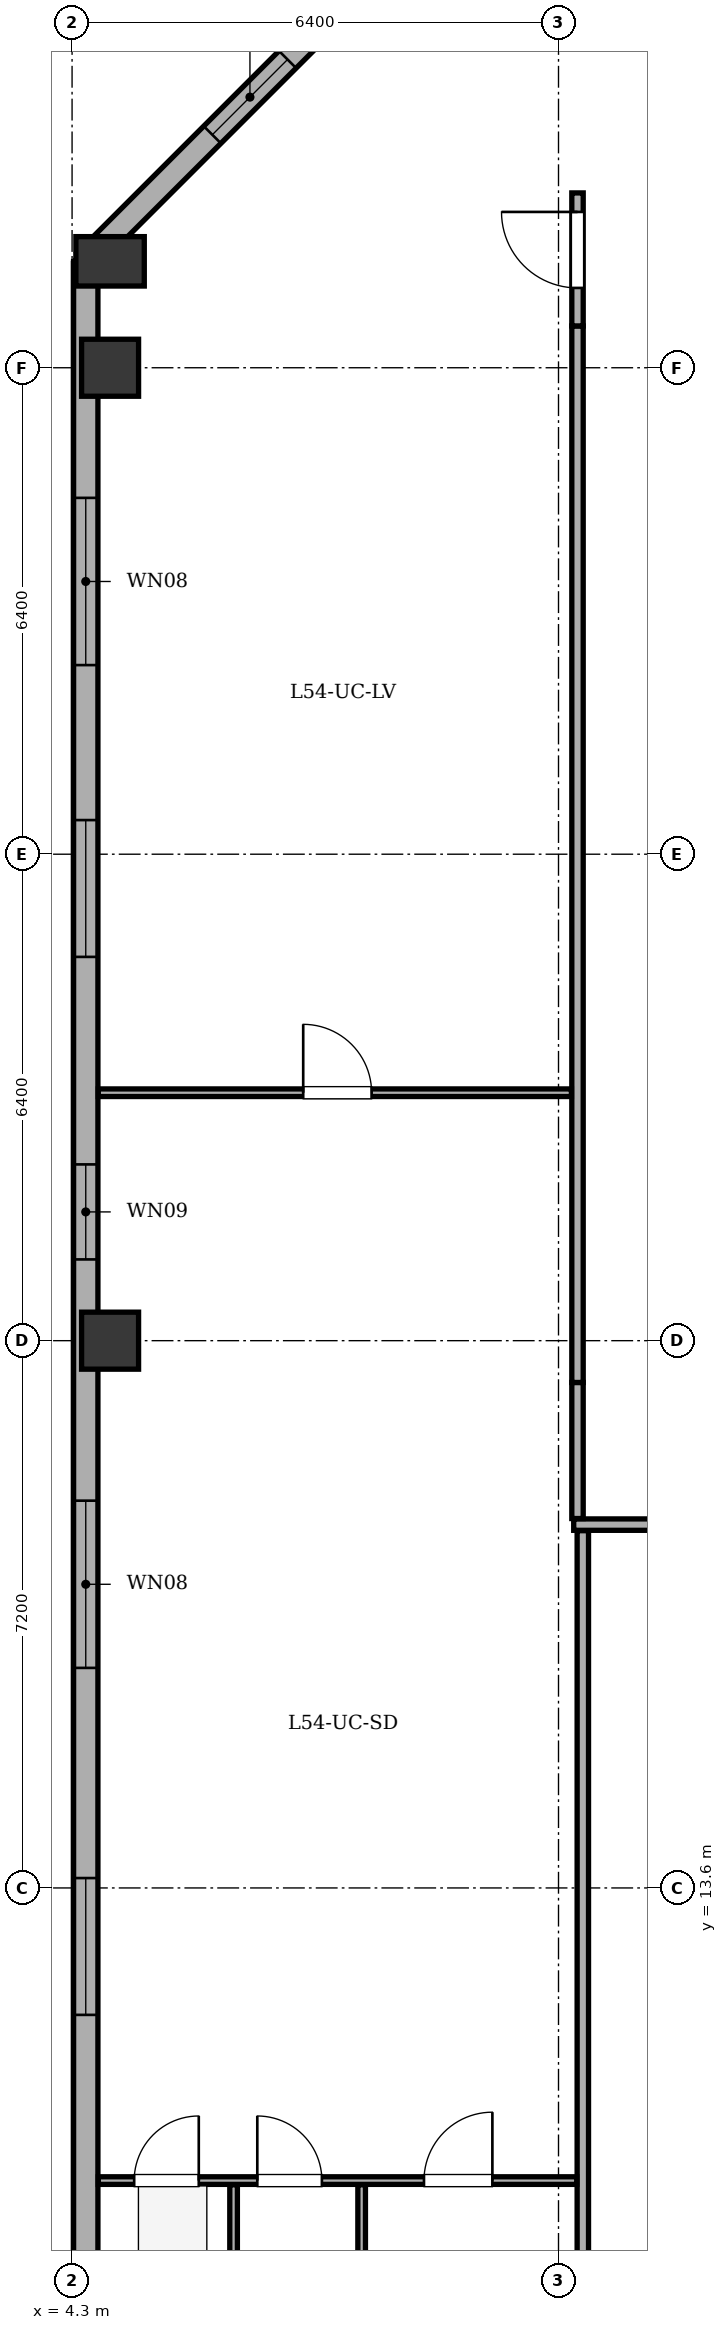
"""IFC4 building model, lengths in metres.
Left out: names, types, materials, properties, quantities, classifications, styles, units other than length and angle.
Written with IfcOpenShell. Run it as: python <this file> out.ifc"""

import sys

from ifc_helpers import new_model, si_unit, direction, frame, frame_2d, origin, origin_2d, place, context, subcontext, project, spatial, rectangle, extrude, element, fill, save


model = new_model("IFC4")
c1 = context("Model", 3, precision=1e-05, world=origin(), true_north=direction((0.0, 1.0)))
c2 = subcontext(c1, "Body", "Model", "MODEL_VIEW")
j1 = project(units=[si_unit("LENGTHUNIT", "METRE"), si_unit("PLANEANGLEUNIT", "RADIAN")], contexts=[c1])
p1 = place(None, origin())
s1 = spatial("IfcSite", under=j1, at=p1, CompositionType="ELEMENT")
p2 = place(p1, origin())
s2 = spatial("IfcBuilding", under=s1, at=p2, CompositionType="ELEMENT")
p3 = place(p2, frame((0.0, 0.0, 210.9)))
s3 = spatial("IfcBuildingStorey", under=s2, at=p3, CompositionType="ELEMENT", Elevation=210.9)
for number, where, z_axis, x_axis in (
    (1, (4.8, 20.8, 0.0), (0.0, 0.0, 1.0), (1.0, 0.0, 0.0)),
    (2, (4.8, 33.6, 0.0), (0.0, 0.0, 1.0), (1.0, 0.0, 0.0)),
):
    element("IfcColumn", number, at=place(p3, frame(where, z_axis=z_axis, x_axis=x_axis)), inside=s3, PredefinedType="COLUMN", context=c2, shape_type="SweptSolid", body=[
        extrude(rectangle(XDim=0.75, YDim=0.75, at=origin_2d()), origin(), (0.0, 0.0, 1.0), 3.4),
    ])
p4 = place(p3, frame((4.8, 35.0, 0.0), z_axis=(0.0, 0.0, 1.0), x_axis=(1.0, 0.0, 0.0)))
e3 = element("IfcColumn", 3, at=p4, inside=s3, PredefinedType="COLUMN", context=c2, shape_type="SweptSolid", body=[
    extrude(rectangle(XDim=0.65, YDim=0.9, at=origin_2d()), origin(), (0.0, 0.0, 1.0), 3.4),
])
p5 = place(p3, frame((4.48, 7.2, 0.0), z_axis=(0.0, 0.0, 1.0), x_axis=(0.0, 1.0, 0.0)))
e4 = element("IfcWall", 4, at=p5, inside=s3, PredefinedType="STANDARD", context=c2, shape_type="SweptSolid", body=[
    extrude(rectangle(XDim=27.8, YDim=0.32, at=frame_2d((13.9, 0.0))), origin(), (0.0, 0.0, 1.0), 2.725),
])
p6 = place(p5, frame((4.73, 0.0, 0.75)))
e5 = element("IfcOpeningElement", 5, at=p6, cuts=e4, PredefinedType="OPENING", context=c2, shape_type="SweptSolid", body=[
    extrude(rectangle(XDim=1.8, YDim=1.7, at=frame_2d((0.9, 0.85))), frame((0.0, 0.17, 0.0), z_axis=(0.0, -1.0, 0.0), x_axis=(1.0, 0.0, 0.0)), (0.0, 0.0, 1.0), 0.34),
])
p7 = place(p5, frame((9.295, 0.0, 0.75)))
e6 = element("IfcOpeningElement", 6, at=p7, cuts=e4, PredefinedType="OPENING", context=c2, shape_type="SweptSolid", body=[
    extrude(rectangle(XDim=2.2, YDim=1.7, at=frame_2d((1.1, 0.85))), frame((0.0, 0.17, 0.0), z_axis=(0.0, -1.0, 0.0), x_axis=(1.0, 0.0, 0.0)), (0.0, 0.0, 1.0), 0.34),
])
p8 = place(p5, frame((14.669, 0.0, 0.75)))
e7 = element("IfcOpeningElement", 7, at=p8, cuts=e4, PredefinedType="OPENING", context=c2, shape_type="SweptSolid", body=[
    extrude(rectangle(XDim=1.25, YDim=1.7, at=frame_2d((0.625, 0.85))), frame((0.0, 0.17, 0.0), z_axis=(0.0, -1.0, 0.0), x_axis=(1.0, 0.0, 0.0)), (0.0, 0.0, 1.0), 0.34),
])
p9 = place(p5, frame((18.649, 0.0, 0.75)))
e8 = element("IfcOpeningElement", 8, at=p9, cuts=e4, PredefinedType="OPENING", context=c2, shape_type="SweptSolid", body=[
    extrude(rectangle(XDim=1.8, YDim=1.7, at=frame_2d((0.9, 0.85))), frame((0.0, 0.17, 0.0), z_axis=(0.0, -1.0, 0.0), x_axis=(1.0, 0.0, 0.0)), (0.0, 0.0, 1.0), 0.34),
])
p10 = place(p5, frame((22.488, 0.0, 0.75)))
e9 = element("IfcOpeningElement", 9, at=p10, cuts=e4, PredefinedType="OPENING", context=c2, shape_type="SweptSolid", body=[
    extrude(rectangle(XDim=2.2, YDim=1.7, at=frame_2d((1.1, 0.85))), frame((0.0, 0.17, 0.0), z_axis=(0.0, -1.0, 0.0), x_axis=(1.0, 0.0, 0.0)), (0.0, 0.0, 1.0), 0.34),
])
p11 = place(p3, frame((4.48, 35.0, 0.0), z_axis=(0.0, 0.0, 1.0), x_axis=(0.707106781187, 0.707106781187, 0.0)))
e10 = element("IfcWall", 10, at=p11, inside=s3, PredefinedType="STANDARD", context=c2, shape_type="SweptSolid", body=[
    extrude(rectangle(XDim=6.11, YDim=0.32, at=frame_2d((3.055, 0.0))), origin(), (0.0, 0.0, 1.0), 2.725),
])
p12 = place(p11, frame((2.355, 0.0, 0.75)))
e11 = element("IfcOpeningElement", 11, at=p12, cuts=e10, PredefinedType="OPENING", context=c2, shape_type="SweptSolid", body=[
    extrude(rectangle(XDim=1.4, YDim=1.65, at=frame_2d((0.7, 0.825))), frame((0.0, 0.17, 0.0), z_axis=(0.0, -1.0, 0.0), x_axis=(1.0, 0.0, 0.0)), (0.0, 0.0, 1.0), 0.34),
])
p13 = place(p3, frame((10.9, 18.38, 0.0), z_axis=(0.0, 0.0, 1.0), x_axis=(1.0, 0.0, 0.0)))
e12 = element("IfcWall", 12, at=p13, inside=s3, PredefinedType="PARTITIONING", context=c2, shape_type="SweptSolid", body=[
    extrude(rectangle(XDim=34.02, YDim=0.15, at=frame_2d((17.01, 0.0))), origin(), (0.0, 0.0, 1.0), 3.1),
])
p14 = place(p13, frame((7.727, 0.0, 0.0)))
e13 = element("IfcOpeningElement", 13, at=p14, cuts=e12, PredefinedType="OPENING", context=c2, shape_type="SweptSolid", body=[
    extrude(rectangle(XDim=1.0, YDim=2.1, at=frame_2d((0.5, 1.05))), frame((0.0, 0.085, 0.0), z_axis=(0.0, -1.0, 0.0), x_axis=(1.0, 0.0, 0.0)), (0.0, 0.0, 1.0), 0.17),
])
p15 = place(p13, frame((24.617, 0.0, 0.0)))
e14 = element("IfcOpeningElement", 14, at=p15, cuts=e12, PredefinedType="OPENING", context=c2, shape_type="SweptSolid", body=[
    extrude(rectangle(XDim=1.0, YDim=2.1, at=frame_2d((0.5, 1.05))), frame((0.0, 0.085, 0.0), z_axis=(0.0, -1.0, 0.0), x_axis=(1.0, 0.0, 0.0)), (0.0, 0.0, 1.0), 0.17),
])
p16 = place(p3, frame((11.02, 3.045, 0.0), z_axis=(0.0, 0.0, 1.0), x_axis=(0.0, 1.0, 0.0)))
e15 = element("IfcWall", 15, at=p16, inside=s3, PredefinedType="PARTITIONING", context=c2, shape_type="SweptSolid", body=[
    extrude(rectangle(XDim=15.255, YDim=0.15, at=frame_2d((7.627, 0.0))), origin(), (0.0, 0.0, 1.0), 3.1),
])
p17 = place(p3, frame((10.95, 18.46, 0.0), z_axis=(0.0, 0.0, 1.0), x_axis=(0.0, 1.0, 0.0)))
e16 = element("IfcWall", 16, at=p17, inside=s3, PredefinedType="PARTITIONING", context=c2, shape_type="SweptSolid", body=[
    extrude(rectangle(XDim=1.79, YDim=0.15, at=frame_2d((0.895, 0.0))), origin(), (0.0, 0.0, 1.0), 3.1),
])
p18 = place(p3, frame((10.95, 20.25, 0.0), z_axis=(0.0, 0.0, 1.0), x_axis=(0.0, 1.0, 0.0)))
e17 = element("IfcWall", 17, at=p18, inside=s3, PredefinedType="PARTITIONING", context=c2, shape_type="SweptSolid", body=[
    extrude(rectangle(XDim=13.9, YDim=0.15, at=frame_2d((6.95, 0.0))), origin(), (0.0, 0.0, 1.0), 3.1),
])
p19 = place(p3, frame((10.95, 34.15, 0.0), z_axis=(0.0, 0.0, 1.0), x_axis=(0.0, 1.0, 0.0)))
e18 = element("IfcWall", 18, at=p19, inside=s3, PredefinedType="PARTITIONING", context=c2, shape_type="SweptSolid", body=[
    extrude(rectangle(XDim=1.75, YDim=0.15, at=frame_2d((0.875, 0.0))), origin(), (0.0, 0.0, 1.0), 3.1),
])
p20 = place(p19, frame((0.5, 0.0, 0.0)))
e19 = element("IfcOpeningElement", 19, at=p20, cuts=e18, PredefinedType="OPENING", context=c2, shape_type="SweptSolid", body=[
    extrude(rectangle(XDim=1.0, YDim=2.1, at=frame_2d((0.5, 1.05))), frame((0.0, 0.085, 0.0), z_axis=(0.0, -1.0, 0.0), x_axis=(1.0, 0.0, 0.0)), (0.0, 0.0, 1.0), 0.17),
])
p21 = place(p3, frame((4.645, 9.75, 0.0), z_axis=(0.0, 0.0, 1.0), x_axis=(1.0, 0.0, 0.0)))
e20 = element("IfcWall", 20, at=p21, inside=s3, PredefinedType="PARTITIONING", context=c2, shape_type="SweptSolid", body=[
    extrude(rectangle(XDim=6.295, YDim=0.1, at=frame_2d((3.147, 0.0))), origin(), (0.0, 0.0, 1.0), 3.1),
])
p22 = place(p21, frame((0.472, 0.0, 0.0)))
e21 = element("IfcOpeningElement", 21, at=p22, cuts=e20, PredefinedType="OPENING", context=c2, shape_type="SweptSolid", body=[
    extrude(rectangle(XDim=0.85, YDim=2.05, at=frame_2d((0.425, 1.025))), frame((0.0, 0.06, 0.0), z_axis=(0.0, -1.0, 0.0), x_axis=(1.0, 0.0, 0.0)), (0.0, 0.0, 1.0), 0.12),
])
p23 = place(p21, frame((2.092, 0.0, 0.0)))
e22 = element("IfcOpeningElement", 22, at=p23, cuts=e20, PredefinedType="OPENING", context=c2, shape_type="SweptSolid", body=[
    extrude(rectangle(XDim=0.85, YDim=2.05, at=frame_2d((0.425, 1.025))), frame((0.0, 0.06, 0.0), z_axis=(0.0, -1.0, 0.0), x_axis=(1.0, 0.0, 0.0)), (0.0, 0.0, 1.0), 0.12),
])
p24 = place(p21, frame((4.285, 0.0, 0.0)))
e23 = element("IfcOpeningElement", 23, at=p24, cuts=e20, PredefinedType="OPENING", context=c2, shape_type="SweptSolid", body=[
    extrude(rectangle(XDim=0.9, YDim=2.05, at=frame_2d((0.45, 1.025))), frame((0.0, 0.06, 0.0), z_axis=(0.0, -1.0, 0.0), x_axis=(1.0, 0.0, 0.0)), (0.0, 0.0, 1.0), 0.12),
])
p25 = place(p3, frame((4.645, 24.062, 0.0), z_axis=(0.0, 0.0, 1.0), x_axis=(1.0, 0.0, 0.0)))
e24 = element("IfcWall", 24, at=p25, inside=s3, PredefinedType="PARTITIONING", context=c2, shape_type="SweptSolid", body=[
    extrude(rectangle(XDim=6.225, YDim=0.1, at=frame_2d((3.113, 0.0))), origin(), (0.0, 0.0, 1.0), 3.1),
])
p26 = place(p25, frame((2.696, 0.0, 0.0)))
e25 = element("IfcOpeningElement", 25, at=p26, cuts=e24, PredefinedType="OPENING", context=c2, shape_type="SweptSolid", body=[
    extrude(rectangle(XDim=0.9, YDim=2.05, at=frame_2d((0.45, 1.025))), frame((0.0, 0.06, 0.0), z_axis=(0.0, -1.0, 0.0), x_axis=(1.0, 0.0, 0.0)), (0.0, 0.0, 1.0), 0.12),
])
for number, where, z_axis, x_axis in (
    (26, (6.425, 7.08, 0.0), (0.0, 0.0, 1.0), (0.0, 1.0, 0.0)),
    (27, (8.11, 7.08, 0.0), (0.0, 0.0, 1.0), (0.0, 1.0, 0.0)),
):
    element("IfcWall", number, at=place(p3, frame(where, z_axis=z_axis, x_axis=x_axis)), inside=s3, PredefinedType="PARTITIONING", context=c2, shape_type="SweptSolid", body=[
        extrude(rectangle(XDim=2.615, YDim=0.1, at=frame_2d((1.308, 0.0))), origin(), (0.0, 0.0, 1.0), 3.1),
    ])
p27 = place(p6, origin())
e28 = element("IfcWindow", 28, at=p27, inside=s3, PartitioningType="SINGLE_PANEL", PredefinedType="WINDOW", context=c2, shape_type="SweptSolid", body=[
    extrude(rectangle(XDim=1.8, YDim=1.7, at=frame_2d((0.9, 0.85))), frame((0.0, -0.01, 0.0), z_axis=(0.0, -1.0, 0.0), x_axis=(1.0, 0.0, 0.0)), (0.0, 0.0, 1.0), 0.06),
])
fill(e5, e28)
p28 = place(p7, origin())
e29 = element("IfcWindow", 29, at=p28, inside=s3, PartitioningType="SINGLE_PANEL", PredefinedType="WINDOW", context=c2, shape_type="SweptSolid", body=[
    extrude(rectangle(XDim=2.2, YDim=1.7, at=frame_2d((1.1, 0.85))), frame((0.0, -0.01, 0.0), z_axis=(0.0, -1.0, 0.0), x_axis=(1.0, 0.0, 0.0)), (0.0, 0.0, 1.0), 0.06),
])
fill(e6, e29)
p29 = place(p8, origin())
e30 = element("IfcWindow", 30, at=p29, inside=s3, PartitioningType="SINGLE_PANEL", PredefinedType="WINDOW", context=c2, shape_type="SweptSolid", body=[
    extrude(rectangle(XDim=1.25, YDim=1.7, at=frame_2d((0.625, 0.85))), frame((0.0, -0.01, 0.0), z_axis=(0.0, -1.0, 0.0), x_axis=(1.0, 0.0, 0.0)), (0.0, 0.0, 1.0), 0.06),
])
fill(e7, e30)
p30 = place(p9, origin())
e31 = element("IfcWindow", 31, at=p30, inside=s3, PartitioningType="SINGLE_PANEL", PredefinedType="WINDOW", context=c2, shape_type="SweptSolid", body=[
    extrude(rectangle(XDim=1.8, YDim=1.7, at=frame_2d((0.9, 0.85))), frame((0.0, -0.01, 0.0), z_axis=(0.0, -1.0, 0.0), x_axis=(1.0, 0.0, 0.0)), (0.0, 0.0, 1.0), 0.06),
])
fill(e8, e31)
p31 = place(p10, origin())
e32 = element("IfcWindow", 32, at=p31, inside=s3, PartitioningType="SINGLE_PANEL", PredefinedType="WINDOW", context=c2, shape_type="SweptSolid", body=[
    extrude(rectangle(XDim=2.2, YDim=1.7, at=frame_2d((1.1, 0.85))), frame((0.0, -0.01, 0.0), z_axis=(0.0, -1.0, 0.0), x_axis=(1.0, 0.0, 0.0)), (0.0, 0.0, 1.0), 0.06),
])
fill(e9, e32)
p32 = place(p12, origin())
e33 = element("IfcWindow", 33, at=p32, inside=s3, PartitioningType="SINGLE_PANEL", PredefinedType="WINDOW", context=c2, shape_type="SweptSolid", body=[
    extrude(rectangle(XDim=1.4, YDim=1.65, at=frame_2d((0.7, 0.825))), frame((0.0, -0.01, 0.0), z_axis=(0.0, -1.0, 0.0), x_axis=(1.0, 0.0, 0.0)), (0.0, 0.0, 1.0), 0.06),
])
fill(e11, e33)
p33 = place(p20, origin())
e34 = element("IfcDoor", 34, at=p33, inside=s3, OperationType="SINGLE_SWING_RIGHT", PredefinedType="DOOR", context=c2, shape_type="SweptSolid", body=[
    extrude(rectangle(XDim=1.0, YDim=2.1, at=frame_2d((0.5, 1.05))), frame((0.0, 0.025, 0.0), z_axis=(0.0, -1.0, 0.0), x_axis=(1.0, 0.0, 0.0)), (0.0, 0.0, 1.0), 0.05),
])
fill(e19, e34)
p34 = place(p26, origin())
e35 = element("IfcDoor", 35, at=p34, inside=s3, OperationType="SINGLE_SWING_LEFT", PredefinedType="DOOR", context=c2, shape_type="SweptSolid", body=[
    extrude(rectangle(XDim=0.9, YDim=2.05, at=frame_2d((0.45, 1.025))), frame((0.0, 0.025, 0.0), z_axis=(0.0, -1.0, 0.0), x_axis=(1.0, 0.0, 0.0)), (0.0, 0.0, 1.0), 0.05),
])
fill(e25, e35)
p35 = place(p22, origin())
e36 = element("IfcDoor", 36, at=p35, inside=s3, OperationType="SINGLE_SWING_RIGHT", PredefinedType="DOOR", context=c2, shape_type="SweptSolid", body=[
    extrude(rectangle(XDim=0.85, YDim=2.05, at=frame_2d((0.425, 1.025))), frame((0.0, 0.025, 0.0), z_axis=(0.0, -1.0, 0.0), x_axis=(1.0, 0.0, 0.0)), (0.0, 0.0, 1.0), 0.05),
])
fill(e21, e36)
p36 = place(p23, origin())
e37 = element("IfcDoor", 37, at=p36, inside=s3, OperationType="SINGLE_SWING_LEFT", PredefinedType="DOOR", context=c2, shape_type="SweptSolid", body=[
    extrude(rectangle(XDim=0.85, YDim=2.05, at=frame_2d((0.425, 1.025))), frame((0.0, 0.025, 0.0), z_axis=(0.0, -1.0, 0.0), x_axis=(1.0, 0.0, 0.0)), (0.0, 0.0, 1.0), 0.05),
])
fill(e22, e37)
p37 = place(p24, origin())
e38 = element("IfcDoor", 38, at=p37, inside=s3, OperationType="SINGLE_SWING_RIGHT", PredefinedType="DOOR", context=c2, shape_type="SweptSolid", body=[
    extrude(rectangle(XDim=0.9, YDim=2.05, at=frame_2d((0.45, 1.025))), frame((0.0, 0.025, 0.0), z_axis=(0.0, -1.0, 0.0), x_axis=(1.0, 0.0, 0.0)), (0.0, 0.0, 1.0), 0.05),
])
fill(e23, e38)
save(model, sys.argv[1])
